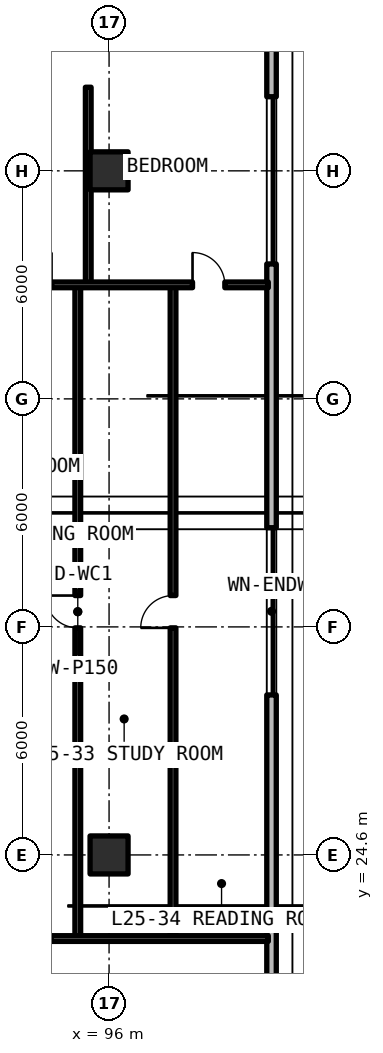
"""IFC4 building model, lengths in metres.
Left out: names, types, materials, properties, quantities, classifications, styles, units other than length and angle.
Written with IfcOpenShell. Run it as: python <this file> out.ifc"""

import sys

from ifc_helpers import new_model, si_unit, direction, frame, frame_2d, origin, origin_2d, place, context, subcontext, project, spatial, rectangle, extrude, element, fill, save


model = new_model("IFC4")
c1 = context("Model", 3, precision=1e-05, world=origin(), true_north=direction((0.0, 1.0)))
c2 = subcontext(c1, "Body", "Model", "MODEL_VIEW")
j1 = project(units=[si_unit("LENGTHUNIT", "METRE"), si_unit("PLANEANGLEUNIT", "RADIAN")], contexts=[c1])
p1 = place(None, origin())
s1 = spatial("IfcSite", under=j1, at=p1, CompositionType="ELEMENT")
p2 = place(p1, origin())
s2 = spatial("IfcBuilding", under=s1, at=p2, CompositionType="ELEMENT")
p3 = place(p2, frame((0.0, 0.0, 92.07)))
s3 = spatial("IfcBuildingStorey", under=s2, at=p3, CompositionType="ELEMENT", Elevation=92.07)
for number, where, z_axis, x_axis in (
    (1, (96.0, 24.6, 0.0), (0.0, 0.0, 1.0), (1.0, 0.0, 0.0)),
    (2, (96.0, 42.6, 0.0), (0.0, 0.0, 1.0), (1.0, 0.0, 0.0)),
):
    element("IfcColumn", number, at=place(p3, frame(where, z_axis=z_axis, x_axis=x_axis)), inside=s3, PredefinedType="COLUMN", context=c2, shape_type="SweptSolid", body=[
        extrude(rectangle(XDim=1.0, YDim=1.0, at=origin_2d()), origin(), (0.0, 0.0, 1.0), 3.3),
    ])
p4 = place(p3, frame((100.275, 13.852, 0.0), z_axis=(0.0, 0.0, 1.0), x_axis=(0.0, 1.0, 0.0)))
e3 = element("IfcWall", 3, at=p4, inside=s3, PredefinedType="SOLIDWALL", context=c2, shape_type="SweptSolid", body=[
    extrude(rectangle(XDim=39.496, YDim=0.25, at=frame_2d((19.748, 0.0))), origin(), (0.0, 0.0, 1.0), 3.08),
])
p5 = place(p4, frame((14.958, 0.0, 0.78)))
e4 = element("IfcOpeningElement", 4, at=p5, cuts=e3, PredefinedType="OPENING", context=c2, shape_type="SweptSolid", body=[
    extrude(rectangle(XDim=4.4, YDim=1.66, at=frame_2d((2.2, 0.83))), frame((0.0, 0.135, 0.0), z_axis=(0.0, -1.0, 0.0), x_axis=(1.0, 0.0, 0.0)), (0.0, 0.0, 1.0), 0.27),
])
p6 = place(p4, frame((26.298, 0.0, 0.78)))
e5 = element("IfcOpeningElement", 5, at=p6, cuts=e3, PredefinedType="OPENING", context=c2, shape_type="SweptSolid", body=[
    extrude(rectangle(XDim=4.4, YDim=1.66, at=frame_2d((2.2, 0.83))), frame((0.0, 0.135, 0.0), z_axis=(0.0, -1.0, 0.0), x_axis=(1.0, 0.0, 0.0)), (0.0, 0.0, 1.0), 0.27),
])
p7 = place(p4, frame((2.454, 0.0, 0.78)))
e6 = element("IfcOpeningElement", 6, at=p7, cuts=e3, PredefinedType="OPENING", context=c2, shape_type="SweptSolid", body=[
    extrude(rectangle(XDim=1.4, YDim=1.65, at=frame_2d((0.7, 0.825))), frame((0.0, 0.135, 0.0), z_axis=(0.0, -1.0, 0.0), x_axis=(1.0, 0.0, 0.0)), (0.0, 0.0, 1.0), 0.27),
])
p8 = place(p3, frame((95.177, 22.4, 0.0), z_axis=(0.0, 0.0, 1.0), x_axis=(0.0, 1.0, 0.0)))
e7 = element("IfcWall", 7, at=p8, inside=s3, PredefinedType="PARTITIONING", context=c2, shape_type="SweptSolid", body=[
    extrude(rectangle(XDim=17.2, YDim=0.15, at=frame_2d((8.6, 0.0))), origin(), (0.0, 0.0, 1.0), 2.35),
])
p9 = place(p8, frame((8.175, 0.0, 0.0)))
e8 = element("IfcOpeningElement", 8, at=p9, cuts=e7, PredefinedType="OPENING", context=c2, shape_type="SweptSolid", body=[
    extrude(rectangle(XDim=0.85, YDim=2.1, at=frame_2d((0.425, 1.05))), frame((0.0, 0.085, 0.0), z_axis=(0.0, -1.0, 0.0), x_axis=(1.0, 0.0, 0.0)), (0.0, 0.0, 1.0), 0.17),
])
p10 = place(p3, frame((97.683, 22.4, 0.0), z_axis=(0.0, 0.0, 1.0), x_axis=(0.0, 1.0, 0.0)))
e9 = element("IfcWall", 9, at=p10, inside=s3, PredefinedType="PARTITIONING", context=c2, shape_type="SweptSolid", body=[
    extrude(rectangle(XDim=17.2, YDim=0.15, at=frame_2d((8.6, 0.0))), origin(), (0.0, 0.0, 1.0), 2.35),
])
p11 = place(p10, frame((8.175, 0.0, 0.0)))
e10 = element("IfcOpeningElement", 10, at=p11, cuts=e9, PredefinedType="OPENING", context=c2, shape_type="SweptSolid", body=[
    extrude(rectangle(XDim=0.85, YDim=2.1, at=frame_2d((0.425, 1.05))), frame((0.0, 0.085, 0.0), z_axis=(0.0, -1.0, 0.0), x_axis=(1.0, 0.0, 0.0)), (0.0, 0.0, 1.0), 0.17),
])
p12 = place(p3, frame((95.452, 39.6, 0.0), z_axis=(0.0, 0.0, 1.0), x_axis=(0.0, 1.0, 0.0)))
e11 = element("IfcWall", 11, at=p12, inside=s3, PredefinedType="PARTITIONING", context=c2, shape_type="SweptSolid", body=[
    extrude(rectangle(XDim=5.2, YDim=0.15, at=frame_2d((2.6, 0.0))), origin(), (0.0, 0.0, 1.0), 2.35),
])
p13 = place(p3, frame((90.32, 39.6, 0.0), z_axis=(0.0, 0.0, 1.0), x_axis=(1.0, 0.0, 0.0)))
e12 = element("IfcWall", 12, at=p13, inside=s3, PredefinedType="PARTITIONING", context=c2, shape_type="SweptSolid", body=[
    extrude(rectangle(XDim=9.87, YDim=0.15, at=frame_2d((4.935, 0.0))), origin(), (0.0, 0.0, 1.0), 2.35),
])
p14 = place(p13, frame((3.316, 0.0, 0.0)))
e13 = element("IfcOpeningElement", 13, at=p14, cuts=e12, PredefinedType="OPENING", context=c2, shape_type="SweptSolid", body=[
    extrude(rectangle(XDim=0.85, YDim=2.1, at=frame_2d((0.425, 1.05))), frame((0.0, 0.085, 0.0), z_axis=(0.0, -1.0, 0.0), x_axis=(1.0, 0.0, 0.0)), (0.0, 0.0, 1.0), 0.17),
])
p15 = place(p13, frame((7.876, 0.0, 0.0)))
e14 = element("IfcOpeningElement", 14, at=p15, cuts=e12, PredefinedType="OPENING", context=c2, shape_type="SweptSolid", body=[
    extrude(rectangle(XDim=0.85, YDim=2.1, at=frame_2d((0.425, 1.05))), frame((0.0, 0.085, 0.0), z_axis=(0.0, -1.0, 0.0), x_axis=(1.0, 0.0, 0.0)), (0.0, 0.0, 1.0), 0.17),
])
p16 = place(p3, frame((90.32, 22.4, 0.0), z_axis=(0.0, 0.0, 1.0), x_axis=(1.0, 0.0, 0.0)))
e15 = element("IfcWall", 15, at=p16, inside=s3, PredefinedType="SOLIDWALL", context=c2, shape_type="SweptSolid", body=[
    extrude(rectangle(XDim=9.87, YDim=0.15, at=frame_2d((4.935, 0.0))), origin(), (0.0, 0.0, 1.0), 2.35),
])
p17 = place(p16, frame((3.193, 0.0, 0.0)))
e16 = element("IfcOpeningElement", 16, at=p17, cuts=e15, PredefinedType="OPENING", context=c2, shape_type="SweptSolid", body=[
    extrude(rectangle(XDim=0.95, YDim=2.15, at=frame_2d((0.475, 1.075))), frame((0.0, 0.085, 0.0), z_axis=(0.0, -1.0, 0.0), x_axis=(1.0, 0.0, 0.0)), (0.0, 0.0, 1.0), 0.17),
])
p18 = place(p5, origin())
e17 = element("IfcWindow", 17, at=p18, inside=s3, PartitioningType="SINGLE_PANEL", PredefinedType="WINDOW", context=c2, shape_type="SweptSolid", body=[
    extrude(rectangle(XDim=4.4, YDim=1.66, at=frame_2d((2.2, 0.83))), frame((0.0, 0.03, 0.0), z_axis=(0.0, -1.0, 0.0), x_axis=(1.0, 0.0, 0.0)), (0.0, 0.0, 1.0), 0.06),
])
fill(e4, e17)
p19 = place(p6, origin())
e18 = element("IfcWindow", 18, at=p19, inside=s3, PartitioningType="SINGLE_PANEL", PredefinedType="WINDOW", context=c2, shape_type="SweptSolid", body=[
    extrude(rectangle(XDim=4.4, YDim=1.66, at=frame_2d((2.2, 0.83))), frame((0.0, 0.03, 0.0), z_axis=(0.0, -1.0, 0.0), x_axis=(1.0, 0.0, 0.0)), (0.0, 0.0, 1.0), 0.06),
])
fill(e5, e18)
p20 = place(p9, origin())
e19 = element("IfcDoor", 19, at=p20, inside=s3, OperationType="SINGLE_SWING_RIGHT", PredefinedType="DOOR", context=c2, shape_type="SweptSolid", body=[
    extrude(rectangle(XDim=0.85, YDim=2.1, at=frame_2d((0.425, 1.05))), frame((0.0, 0.025, 0.0), z_axis=(0.0, -1.0, 0.0), x_axis=(1.0, 0.0, 0.0)), (0.0, 0.0, 1.0), 0.05),
])
fill(e8, e19)
p21 = place(p11, origin())
e20 = element("IfcDoor", 20, at=p21, inside=s3, OperationType="SINGLE_SWING_LEFT", PredefinedType="DOOR", context=c2, shape_type="SweptSolid", body=[
    extrude(rectangle(XDim=0.85, YDim=2.1, at=frame_2d((0.425, 1.05))), frame((0.0, 0.025, 0.0), z_axis=(0.0, -1.0, 0.0), x_axis=(1.0, 0.0, 0.0)), (0.0, 0.0, 1.0), 0.05),
])
fill(e10, e20)
p22 = place(p15, origin())
e21 = element("IfcDoor", 21, at=p22, inside=s3, OperationType="SINGLE_SWING_LEFT", PredefinedType="DOOR", context=c2, shape_type="SweptSolid", body=[
    extrude(rectangle(XDim=0.85, YDim=2.1, at=frame_2d((0.425, 1.05))), frame((0.0, 0.025, 0.0), z_axis=(0.0, -1.0, 0.0), x_axis=(1.0, 0.0, 0.0)), (0.0, 0.0, 1.0), 0.05),
])
fill(e14, e21)
save(model, sys.argv[1])
